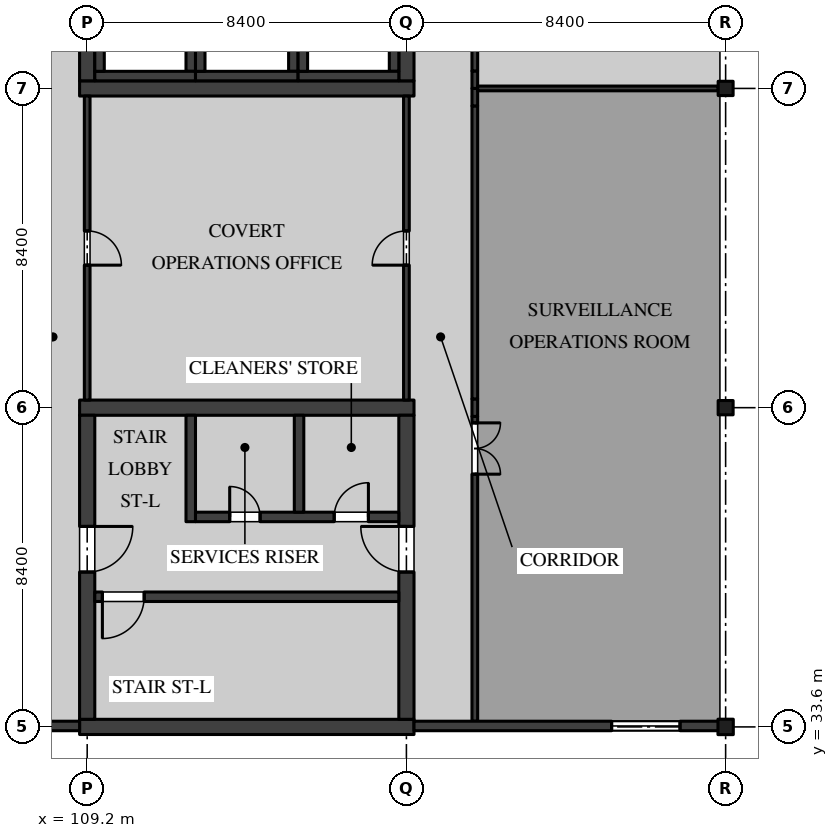
"""IFC4 building model, lengths in metres.
Left out: names, types, materials, properties, quantities, classifications, styles, units other than length and angle.
Written with IfcOpenShell. Run it as: python <this file> out.ifc"""

import sys

from ifc_helpers import new_model, si_unit, direction, frame, frame_2d, origin, origin_2d, place, context, subcontext, project, spatial, rectangle, i_section, extrude, element, fill, save


model = new_model("IFC4")
c1 = context("Model", 3, precision=1e-05, world=origin(), true_north=direction((0.0, 1.0)))
c2 = subcontext(c1, "Body", "Model", "MODEL_VIEW")
j1 = project(units=[si_unit("LENGTHUNIT", "METRE"), si_unit("PLANEANGLEUNIT", "RADIAN")], contexts=[c1])
p1 = place(None, origin())
s1 = spatial("IfcSite", under=j1, at=p1, CompositionType="ELEMENT")
p2 = place(p1, origin())
s2 = spatial("IfcBuilding", under=s1, at=p2, CompositionType="ELEMENT")
p3 = place(p2, frame((0.0, 0.0, 18.9)))
s3 = spatial("IfcBuildingStorey", under=s2, at=p3, CompositionType="ELEMENT", Elevation=18.9)
p4 = place(p3, frame((126.0, 33.6, 0.0), z_axis=(0.0, 0.0, 1.0), x_axis=(1.0, 0.0, 0.0)))
e1 = element("IfcColumn", 1, at=p4, inside=s3, PredefinedType="COLUMN", context=c2, shape_type="SweptSolid", body=[
    extrude(i_section(OverallWidth=0.404, OverallDepth=0.406, WebThickness=0.027, FlangeThickness=0.044, FilletRadius=0.015, at=origin_2d()), origin(), (0.0, 0.0, 1.0), 4.37),
])
for number, where, z_axis, x_axis in (
    (2, (126.0, 42.0, 0.0), (0.0, 0.0, 1.0), (1.0, 0.0, 0.0)),
    (3, (126.0, 50.4, 0.0), (0.0, 0.0, 1.0), (1.0, 0.0, 0.0)),
):
    element("IfcColumn", number, at=place(p3, frame(where, z_axis=z_axis, x_axis=x_axis)), inside=s3, PredefinedType="COLUMN", context=c2, shape_type="SweptSolid", body=[
        extrude(i_section(OverallWidth=0.394, OverallDepth=0.376, WebThickness=0.017, FlangeThickness=0.028, FilletRadius=0.015, at=origin_2d()), origin(), (0.0, 0.0, 1.0), 4.37),
    ])
p5 = place(p3, frame((109.0, 50.4, 0.0), z_axis=(0.0, 0.0, 1.0), x_axis=(1.0, 0.0, 0.0)))
e4 = element("IfcWall", 4, at=p5, inside=s3, PredefinedType="SHEAR", context=c2, shape_type="SweptSolid", body=[
    extrude(rectangle(XDim=8.8, YDim=0.4, at=frame_2d((4.4, 0.0))), origin(), (0.0, 0.0, 1.0), 4.37),
])
p6 = place(p3, frame((109.2, 50.6, 0.0), z_axis=(0.0, 0.0, 1.0), x_axis=(0.0, 1.0, 0.0)))
e5 = element("IfcWall", 5, at=p6, inside=s3, PredefinedType="SHEAR", context=c2, shape_type="SweptSolid", body=[
    extrude(rectangle(XDim=8.0, YDim=0.4, at=frame_2d((4.0, 0.0))), origin(), (0.0, 0.0, 1.0), 4.37),
])
p7 = place(p6, frame((3.25, 0.0, 0.0)))
e6 = element("IfcOpeningElement", 6, at=p7, cuts=e5, PredefinedType="OPENING", context=c2, shape_type="SweptSolid", body=[
    extrude(rectangle(XDim=1.2, YDim=2.1, at=frame_2d((0.6, 1.05))), frame((0.0, 0.21, 0.0), z_axis=(0.0, -1.0, 0.0), x_axis=(1.0, 0.0, 0.0)), (0.0, 0.0, 1.0), 0.42),
])
p8 = place(p3, frame((117.6, 50.6, 0.0), z_axis=(0.0, 0.0, 1.0), x_axis=(0.0, 1.0, 0.0)))
e7 = element("IfcWall", 7, at=p8, inside=s3, PredefinedType="SHEAR", context=c2, shape_type="SweptSolid", body=[
    extrude(rectangle(XDim=8.0, YDim=0.4, at=frame_2d((4.0, 0.0))), origin(), (0.0, 0.0, 1.0), 4.37),
])
p9 = place(p8, frame((3.25, 0.0, 0.0)))
e8 = element("IfcOpeningElement", 8, at=p9, cuts=e7, PredefinedType="OPENING", context=c2, shape_type="SweptSolid", body=[
    extrude(rectangle(XDim=1.2, YDim=2.1, at=frame_2d((0.6, 1.05))), frame((0.0, 0.21, 0.0), z_axis=(0.0, -1.0, 0.0), x_axis=(1.0, 0.0, 0.0)), (0.0, 0.0, 1.0), 0.42),
])
p10 = place(p8, frame((6.0, 0.0, 0.0)))
e9 = element("IfcOpeningElement", 9, at=p10, cuts=e7, PredefinedType="OPENING", context=c2, shape_type="SweptSolid", body=[
    extrude(rectangle(XDim=1.2, YDim=2.1, at=frame_2d((0.6, 1.05))), frame((0.0, 0.21, 0.0), z_axis=(0.0, -1.0, 0.0), x_axis=(1.0, 0.0, 0.0)), (0.0, 0.0, 1.0), 0.42),
])
for number, where, z_axis, x_axis in (
    (10, (109.0, 33.6, 0.0), (0.0, 0.0, 1.0), (1.0, 0.0, 0.0)),
    (11, (109.0, 42.0, 0.0), (0.0, 0.0, 1.0), (1.0, 0.0, 0.0)),
):
    element("IfcWall", number, at=place(p3, frame(where, z_axis=z_axis, x_axis=x_axis)), inside=s3, PredefinedType="SHEAR", context=c2, shape_type="SweptSolid", body=[
        extrude(rectangle(XDim=8.8, YDim=0.4, at=frame_2d((4.4, 0.0))), origin(), (0.0, 0.0, 1.0), 4.37),
    ])
p11 = place(p3, frame((109.2, 33.8, 0.0), z_axis=(0.0, 0.0, 1.0), x_axis=(0.0, 1.0, 0.0)))
e12 = element("IfcWall", 12, at=p11, inside=s3, PredefinedType="SHEAR", context=c2, shape_type="SweptSolid", body=[
    extrude(rectangle(XDim=8.0, YDim=0.4, at=frame_2d((4.0, 0.0))), origin(), (0.0, 0.0, 1.0), 4.37),
])
p12 = place(p11, frame((3.875, 0.0, 0.0)))
e13 = element("IfcOpeningElement", 13, at=p12, cuts=e12, PredefinedType="OPENING", context=c2, shape_type="SweptSolid", body=[
    extrude(rectangle(XDim=1.2, YDim=2.1, at=frame_2d((0.6, 1.05))), frame((0.0, 0.21, 0.0), z_axis=(0.0, -1.0, 0.0), x_axis=(1.0, 0.0, 0.0)), (0.0, 0.0, 1.0), 0.42),
])
p13 = place(p3, frame((117.6, 33.8, 0.0), z_axis=(0.0, 0.0, 1.0), x_axis=(0.0, 1.0, 0.0)))
e14 = element("IfcWall", 14, at=p13, inside=s3, PredefinedType="SHEAR", context=c2, shape_type="SweptSolid", body=[
    extrude(rectangle(XDim=8.0, YDim=0.4, at=frame_2d((4.0, 0.0))), origin(), (0.0, 0.0, 1.0), 4.37),
])
p14 = place(p13, frame((3.875, 0.0, 0.0)))
e15 = element("IfcOpeningElement", 15, at=p14, cuts=e14, PredefinedType="OPENING", context=c2, shape_type="SweptSolid", body=[
    extrude(rectangle(XDim=1.2, YDim=2.1, at=frame_2d((0.6, 1.05))), frame((0.0, 0.21, 0.0), z_axis=(0.0, -1.0, 0.0), x_axis=(1.0, 0.0, 0.0)), (0.0, 0.0, 1.0), 0.42),
])
p15 = place(p3, frame((109.4, 37.025, 0.0), z_axis=(0.0, 0.0, 1.0), x_axis=(1.0, 0.0, 0.0)))
e16 = element("IfcWall", 16, at=p15, inside=s3, PredefinedType="SOLIDWALL", context=c2, shape_type="SweptSolid", body=[
    extrude(rectangle(XDim=8.0, YDim=0.25, at=frame_2d((4.0, 0.0))), origin(), (0.0, 0.0, 1.0), 4.37),
])
p16 = place(p15, frame((0.2, 0.0, 0.0)))
e17 = element("IfcOpeningElement", 17, at=p16, cuts=e16, PredefinedType="OPENING", context=c2, shape_type="SweptSolid", body=[
    extrude(rectangle(XDim=1.1, YDim=2.1, at=frame_2d((0.55, 1.05))), frame((0.0, 0.135, 0.0), z_axis=(0.0, -1.0, 0.0), x_axis=(1.0, 0.0, 0.0)), (0.0, 0.0, 1.0), 0.27),
])
p17 = place(p3, frame((111.925, 39.0, 0.0), z_axis=(0.0, 0.0, 1.0), x_axis=(0.0, 1.0, 0.0)))
e18 = element("IfcWall", 18, at=p17, inside=s3, PredefinedType="SOLIDWALL", context=c2, shape_type="SweptSolid", body=[
    extrude(rectangle(XDim=2.8, YDim=0.25, at=frame_2d((1.4, 0.0))), origin(), (0.0, 0.0, 1.0), 4.37),
])
p18 = place(p3, frame((112.05, 39.125, 0.0), z_axis=(0.0, 0.0, 1.0), x_axis=(1.0, 0.0, 0.0)))
e19 = element("IfcWall", 19, at=p18, inside=s3, PredefinedType="SOLIDWALL", context=c2, shape_type="SweptSolid", body=[
    extrude(rectangle(XDim=5.35, YDim=0.25, at=frame_2d((2.675, 0.0))), origin(), (0.0, 0.0, 1.0), 4.37),
])
p19 = place(p18, frame((3.65, 0.0, 0.0)))
e20 = element("IfcOpeningElement", 20, at=p19, cuts=e19, PredefinedType="OPENING", context=c2, shape_type="SweptSolid", body=[
    extrude(rectangle(XDim=0.9, YDim=2.1, at=frame_2d((0.45, 1.05))), frame((0.0, 0.135, 0.0), z_axis=(0.0, -1.0, 0.0), x_axis=(1.0, 0.0, 0.0)), (0.0, 0.0, 1.0), 0.27),
])
p20 = place(p18, frame((0.9, 0.0, 0.0)))
e21 = element("IfcOpeningElement", 21, at=p20, cuts=e19, PredefinedType="OPENING", context=c2, shape_type="SweptSolid", body=[
    extrude(rectangle(XDim=0.8, YDim=2.1, at=frame_2d((0.4, 1.05))), frame((0.0, 0.135, 0.0), z_axis=(0.0, -1.0, 0.0), x_axis=(1.0, 0.0, 0.0)), (0.0, 0.0, 1.0), 0.27),
])
p21 = place(p3, frame((114.775, 39.25, 0.0), z_axis=(0.0, 0.0, 1.0), x_axis=(0.0, 1.0, 0.0)))
e22 = element("IfcWall", 22, at=p21, inside=s3, PredefinedType="SOLIDWALL", context=c2, shape_type="SweptSolid", body=[
    extrude(rectangle(XDim=2.55, YDim=0.25, at=frame_2d((1.275, 0.0))), origin(), (0.0, 0.0, 1.0), 4.37),
])
p22 = place(p3, frame((111.925, 50.85, 0.0), z_axis=(0.0, 0.0, 1.0), x_axis=(0.0, 1.0, 0.0)))
e23 = element("IfcWall", 23, at=p22, inside=s3, PredefinedType="SOLIDWALL", context=c2, shape_type="SweptSolid", body=[
    extrude(rectangle(XDim=2.3, YDim=0.25, at=frame_2d((1.15, 0.0))), origin(), (0.0, 0.0, 1.0), 4.37),
])
p23 = place(p3, frame((109.4, 50.725, 0.0), z_axis=(0.0, 0.0, 1.0), x_axis=(1.0, 0.0, 0.0)))
e24 = element("IfcWall", 24, at=p23, inside=s3, PredefinedType="SOLIDWALL", context=c2, shape_type="SweptSolid", body=[
    extrude(rectangle(XDim=2.65, YDim=0.25, at=frame_2d((1.325, 0.0))), origin(), (0.0, 0.0, 1.0), 4.37),
])
for number, where, z_axis, x_axis in (
    (25, (109.525, 50.85, 0.0), (0.0, 0.0, 1.0), (0.0, 1.0, 0.0)),
    (26, (114.625, 50.85, 0.0), (0.0, 0.0, 1.0), (0.0, 1.0, 0.0)),
):
    element("IfcWall", number, at=place(p3, frame(where, z_axis=z_axis, x_axis=x_axis)), inside=s3, PredefinedType="SOLIDWALL", context=c2, shape_type="SweptSolid", body=[
        extrude(rectangle(XDim=2.3, YDim=0.25, at=frame_2d((1.15, 0.0))), origin(), (0.0, 0.0, 1.0), 4.37),
    ])
p24 = place(p3, frame((112.05, 50.725, 0.0), z_axis=(0.0, 0.0, 1.0), x_axis=(1.0, 0.0, 0.0)))
e27 = element("IfcWall", 27, at=p24, inside=s3, PredefinedType="SOLIDWALL", context=c2, shape_type="SweptSolid", body=[
    extrude(rectangle(XDim=2.7, YDim=0.25, at=frame_2d((1.35, 0.0))), origin(), (0.0, 0.0, 1.0), 4.37),
])
for number, where, z_axis, x_axis in (
    (28, (112.175, 50.85, 0.0), (0.0, 0.0, 1.0), (0.0, 1.0, 0.0)),
    (29, (117.275, 50.85, 0.0), (0.0, 0.0, 1.0), (0.0, 1.0, 0.0)),
):
    element("IfcWall", number, at=place(p3, frame(where, z_axis=z_axis, x_axis=x_axis)), inside=s3, PredefinedType="SOLIDWALL", context=c2, shape_type="SweptSolid", body=[
        extrude(rectangle(XDim=2.3, YDim=0.25, at=frame_2d((1.15, 0.0))), origin(), (0.0, 0.0, 1.0), 4.37),
    ])
p25 = place(p3, frame((114.75, 50.725, 0.0), z_axis=(0.0, 0.0, 1.0), x_axis=(1.0, 0.0, 0.0)))
e30 = element("IfcWall", 30, at=p25, inside=s3, PredefinedType="SOLIDWALL", context=c2, shape_type="SweptSolid", body=[
    extrude(rectangle(XDim=2.65, YDim=0.25, at=frame_2d((1.325, 0.0))), origin(), (0.0, 0.0, 1.0), 4.37),
])
p26 = place(p3, frame((114.875, 50.85, 0.0), z_axis=(0.0, 0.0, 1.0), x_axis=(0.0, 1.0, 0.0)))
e31 = element("IfcWall", 31, at=p26, inside=s3, PredefinedType="SOLIDWALL", context=c2, shape_type="SweptSolid", body=[
    extrude(rectangle(XDim=2.3, YDim=0.25, at=frame_2d((1.15, 0.0))), origin(), (0.0, 0.0, 1.0), 4.37),
])
p27 = place(p3, frame((119.4, 33.75, 0.0), z_axis=(0.0, 0.0, 1.0), x_axis=(0.0, 1.0, 0.0)))
e32 = element("IfcWall", 32, at=p27, inside=s3, PredefinedType="PARTITIONING", context=c2, shape_type="SweptSolid", body=[
    extrude(rectangle(XDim=8.02, YDim=0.15, at=frame_2d((4.01, 0.0))), origin(), (0.0, 0.0, 1.0), 4.37),
])
p28 = place(p27, frame((6.5, 0.0, 0.0)))
e33 = element("IfcOpeningElement", 33, at=p28, cuts=e32, PredefinedType="OPENING", context=c2, shape_type="SweptSolid", body=[
    extrude(rectangle(XDim=1.35, YDim=2.1, at=frame_2d((0.675, 1.05))), frame((0.0, 0.085, 0.0), z_axis=(0.0, -1.0, 0.0), x_axis=(1.0, 0.0, 0.0)), (0.0, 0.0, 1.0), 0.17),
])
p29 = place(p3, frame((119.4, 41.77, 0.0), z_axis=(0.0, 0.0, 1.0), x_axis=(0.0, 1.0, 0.0)))
e34 = element("IfcWall", 34, at=p29, inside=s3, PredefinedType="PARTITIONING", context=c2, shape_type="SweptSolid", body=[
    extrude(rectangle(XDim=0.46, YDim=0.15, at=frame_2d((0.23, 0.0))), origin(), (0.0, 0.0, 1.0), 3.746),
])
p30 = place(p3, frame((119.4, 42.23, 0.0), z_axis=(0.0, 0.0, 1.0), x_axis=(0.0, 1.0, 0.0)))
e35 = element("IfcWall", 35, at=p30, inside=s3, PredefinedType="PARTITIONING", context=c2, shape_type="SweptSolid", body=[
    extrude(rectangle(XDim=7.71, YDim=0.15, at=frame_2d((3.855, 0.0))), origin(), (0.0, 0.0, 1.0), 4.37),
])
p31 = place(p3, frame((119.4, 49.94, 0.0), z_axis=(0.0, 0.0, 1.0), x_axis=(0.0, 1.0, 0.0)))
e36 = element("IfcWall", 36, at=p31, inside=s3, PredefinedType="PARTITIONING", context=c2, shape_type="SweptSolid", body=[
    extrude(rectangle(XDim=0.46, YDim=0.15, at=frame_2d((0.23, 0.0))), origin(), (0.0, 0.0, 1.0), 3.746),
])
p32 = place(p3, frame((119.4, 50.4, 0.0), z_axis=(0.0, 0.0, 1.0), x_axis=(0.0, 1.0, 0.0)))
e37 = element("IfcWall", 37, at=p32, inside=s3, PredefinedType="PARTITIONING", context=c2, shape_type="SweptSolid", body=[
    extrude(rectangle(XDim=0.46, YDim=0.15, at=frame_2d((0.23, 0.0))), origin(), (0.0, 0.0, 1.0), 3.746),
])
p33 = place(p3, frame((119.4, 50.86, 0.0), z_axis=(0.0, 0.0, 1.0), x_axis=(0.0, 1.0, 0.0)))
e38 = element("IfcWall", 38, at=p33, inside=s3, PredefinedType="PARTITIONING", context=c2, shape_type="SweptSolid", body=[
    extrude(rectangle(XDim=7.71, YDim=0.15, at=frame_2d((3.855, 0.0))), origin(), (0.0, 0.0, 1.0), 4.37),
])
p34 = place(p33, frame((5.54, 0.0, 0.0)))
e39 = element("IfcOpeningElement", 39, at=p34, cuts=e38, PredefinedType="OPENING", context=c2, shape_type="SweptSolid", body=[
    extrude(rectangle(XDim=0.9, YDim=2.1, at=frame_2d((0.45, 1.05))), frame((0.0, 0.085, 0.0), z_axis=(0.0, -1.0, 0.0), x_axis=(1.0, 0.0, 0.0)), (0.0, 0.0, 1.0), 0.17),
])
p35 = place(p3, frame((117.6, 42.2, 0.0), z_axis=(0.0, 0.0, 1.0), x_axis=(0.0, 1.0, 0.0)))
e40 = element("IfcWall", 40, at=p35, inside=s3, PredefinedType="PARTITIONING", context=c2, shape_type="SweptSolid", body=[
    extrude(rectangle(XDim=8.0, YDim=0.15, at=frame_2d((4.0, 0.0))), origin(), (0.0, 0.0, 1.0), 3.746),
])
p36 = place(p35, frame((3.55, 0.0, 0.0)))
e41 = element("IfcOpeningElement", 41, at=p36, cuts=e40, PredefinedType="OPENING", context=c2, shape_type="SweptSolid", body=[
    extrude(rectangle(XDim=0.9, YDim=2.1, at=frame_2d((0.45, 1.05))), frame((0.0, 0.085, 0.0), z_axis=(0.0, -1.0, 0.0), x_axis=(1.0, 0.0, 0.0)), (0.0, 0.0, 1.0), 0.17),
])
p37 = place(p3, frame((109.2, 42.2, 0.0), z_axis=(0.0, 0.0, 1.0), x_axis=(0.0, 1.0, 0.0)))
e42 = element("IfcWall", 42, at=p37, inside=s3, PredefinedType="PARTITIONING", context=c2, shape_type="SweptSolid", body=[
    extrude(rectangle(XDim=8.0, YDim=0.15, at=frame_2d((4.0, 0.0))), origin(), (0.0, 0.0, 1.0), 3.746),
])
p38 = place(p37, frame((3.55, 0.0, 0.0)))
e43 = element("IfcOpeningElement", 43, at=p38, cuts=e42, PredefinedType="OPENING", context=c2, shape_type="SweptSolid", body=[
    extrude(rectangle(XDim=0.9, YDim=2.1, at=frame_2d((0.45, 1.05))), frame((0.0, 0.085, 0.0), z_axis=(0.0, -1.0, 0.0), x_axis=(1.0, 0.0, 0.0)), (0.0, 0.0, 1.0), 0.17),
])
p39 = place(p3, frame((119.475, 50.4, 0.0), z_axis=(0.0, 0.0, 1.0), x_axis=(1.0, 0.0, 0.0)))
e44 = element("IfcWall", 44, at=p39, inside=s3, PredefinedType="PARTITIONING", context=c2, shape_type="SweptSolid", body=[
    extrude(rectangle(XDim=6.328, YDim=0.125, at=frame_2d((3.164, 0.0))), origin(), (0.0, 0.0, 1.0), 3.746),
])
p40 = place(p3, frame((100.803, 33.625, 0.0), z_axis=(0.0, 0.0, 1.0), x_axis=(1.0, 0.0, 0.0)))
e45 = element("IfcWall", 45, at=p40, inside=s3, PredefinedType="SOLIDWALL", context=c2, shape_type="SweptSolid", body=[
    extrude(rectangle(XDim=8.197, YDim=0.25, at=frame_2d((4.099, 0.0))), origin(), (0.0, 0.0, 1.0), 3.746),
])
p41 = place(p40, frame((0.897, 0.0, 0.9)))
e46 = element("IfcOpeningElement", 46, at=p41, cuts=e45, PredefinedType="OPENING", context=c2, shape_type="SweptSolid", body=[
    extrude(rectangle(XDim=2.4, YDim=2.1, at=frame_2d((1.2, 1.05))), frame((0.0, 0.135, 0.0), z_axis=(0.0, -1.0, 0.0), x_axis=(1.0, 0.0, 0.0)), (0.0, 0.0, 1.0), 0.27),
])
p42 = place(p3, frame((117.8, 33.625, 0.0), z_axis=(0.0, 0.0, 1.0), x_axis=(1.0, 0.0, 0.0)))
e47 = element("IfcWall", 47, at=p42, inside=s3, PredefinedType="SOLIDWALL", context=c2, shape_type="SweptSolid", body=[
    extrude(rectangle(XDim=8.197, YDim=0.25, at=frame_2d((4.098, 0.0))), origin(), (0.0, 0.0, 1.0), 3.746),
])
p43 = place(p42, frame((5.2, 0.0, 0.9)))
e48 = element("IfcOpeningElement", 48, at=p43, cuts=e47, PredefinedType="OPENING", context=c2, shape_type="SweptSolid", body=[
    extrude(rectangle(XDim=1.8, YDim=2.1, at=frame_2d((0.9, 1.05))), frame((0.0, 0.135, 0.0), z_axis=(0.0, -1.0, 0.0), x_axis=(1.0, 0.0, 0.0)), (0.0, 0.0, 1.0), 0.27),
])
p44 = place(p19, origin())
e49 = element("IfcDoor", 49, at=p44, inside=s3, OperationType="SINGLE_SWING_LEFT", PredefinedType="DOOR", context=c2, shape_type="SweptSolid", body=[
    extrude(rectangle(XDim=0.9, YDim=2.1, at=frame_2d((0.45, 1.05))), frame((0.0, 0.035, 0.0), z_axis=(0.0, -1.0, 0.0), x_axis=(1.0, 0.0, 0.0)), (0.0, 0.0, 1.0), 0.07),
])
fill(e20, e49)
p45 = place(p12, frame((1.2, 0.0, 0.0), z_axis=(0.0, 0.0, 1.0), x_axis=(-1.0, 0.0, 0.0)))
e50 = element("IfcDoor", 50, at=p45, inside=s3, OperationType="SINGLE_SWING_RIGHT", PredefinedType="DOOR", context=c2, shape_type="SweptSolid", body=[
    extrude(rectangle(XDim=1.2, YDim=2.1, at=frame_2d((0.6, 1.05))), frame((0.0, 0.035, 0.0), z_axis=(0.0, -1.0, 0.0), x_axis=(1.0, 0.0, 0.0)), (0.0, 0.0, 1.0), 0.07),
])
fill(e13, e50)
p46 = place(p14, origin())
e51 = element("IfcDoor", 51, at=p46, inside=s3, OperationType="SINGLE_SWING_LEFT", PredefinedType="DOOR", context=c2, shape_type="SweptSolid", body=[
    extrude(rectangle(XDim=1.2, YDim=2.1, at=frame_2d((0.6, 1.05))), frame((0.0, 0.035, 0.0), z_axis=(0.0, -1.0, 0.0), x_axis=(1.0, 0.0, 0.0)), (0.0, 0.0, 1.0), 0.07),
])
fill(e15, e51)
p47 = place(p20, origin())
e52 = element("IfcDoor", 52, at=p47, inside=s3, OperationType="SINGLE_SWING_RIGHT", PredefinedType="DOOR", context=c2, shape_type="SweptSolid", body=[
    extrude(rectangle(XDim=0.8, YDim=2.1, at=frame_2d((0.4, 1.05))), frame((0.0, 0.035, 0.0), z_axis=(0.0, -1.0, 0.0), x_axis=(1.0, 0.0, 0.0)), (0.0, 0.0, 1.0), 0.07),
])
fill(e21, e52)
p48 = place(p16, frame((1.1, 0.0, 0.0), z_axis=(0.0, 0.0, 1.0), x_axis=(-1.0, 0.0, 0.0)))
e53 = element("IfcDoor", 53, at=p48, inside=s3, OperationType="SINGLE_SWING_LEFT", PredefinedType="DOOR", context=c2, shape_type="SweptSolid", body=[
    extrude(rectangle(XDim=1.1, YDim=2.1, at=frame_2d((0.55, 1.05))), frame((0.0, 0.035, 0.0), z_axis=(0.0, -1.0, 0.0), x_axis=(1.0, 0.0, 0.0)), (0.0, 0.0, 1.0), 0.07),
])
fill(e17, e53)
p49 = place(p28, frame((1.35, 0.0, 0.0), z_axis=(0.0, 0.0, 1.0), x_axis=(-1.0, 0.0, 0.0)))
e54 = element("IfcDoor", 54, at=p49, inside=s3, OperationType="DOUBLE_DOOR_SINGLE_SWING", PredefinedType="DOOR", context=c2, shape_type="SweptSolid", body=[
    extrude(rectangle(XDim=1.35, YDim=2.1, at=frame_2d((0.675, 1.05))), frame((0.0, 0.025, 0.0), z_axis=(0.0, -1.0, 0.0), x_axis=(1.0, 0.0, 0.0)), (0.0, 0.0, 1.0), 0.05),
])
fill(e33, e54)
p50 = place(p36, origin())
e55 = element("IfcDoor", 55, at=p50, inside=s3, OperationType="SINGLE_SWING_RIGHT", PredefinedType="DOOR", context=c2, shape_type="SweptSolid", body=[
    extrude(rectangle(XDim=0.9, YDim=2.1, at=frame_2d((0.45, 1.05))), frame((0.0, 0.025, 0.0), z_axis=(0.0, -1.0, 0.0), x_axis=(1.0, 0.0, 0.0)), (0.0, 0.0, 1.0), 0.05),
])
fill(e41, e55)
p51 = place(p38, frame((0.9, 0.0, 0.0), z_axis=(0.0, 0.0, 1.0), x_axis=(-1.0, 0.0, 0.0)))
e56 = element("IfcDoor", 56, at=p51, inside=s3, OperationType="SINGLE_SWING_LEFT", PredefinedType="DOOR", context=c2, shape_type="SweptSolid", body=[
    extrude(rectangle(XDim=0.9, YDim=2.1, at=frame_2d((0.45, 1.05))), frame((0.0, 0.025, 0.0), z_axis=(0.0, -1.0, 0.0), x_axis=(1.0, 0.0, 0.0)), (0.0, 0.0, 1.0), 0.05),
])
fill(e43, e56)
p52 = place(p43, origin())
e57 = element("IfcWindow", 57, at=p52, inside=s3, PartitioningType="SINGLE_PANEL", PredefinedType="WINDOW", context=c2, shape_type="SweptSolid", body=[
    extrude(rectangle(XDim=1.8, YDim=2.1, at=frame_2d((0.9, 1.05))), frame((0.0, 0.04, 0.0), z_axis=(0.0, -1.0, 0.0), x_axis=(1.0, 0.0, 0.0)), (0.0, 0.0, 1.0), 0.08),
])
fill(e48, e57)
save(model, sys.argv[1])
